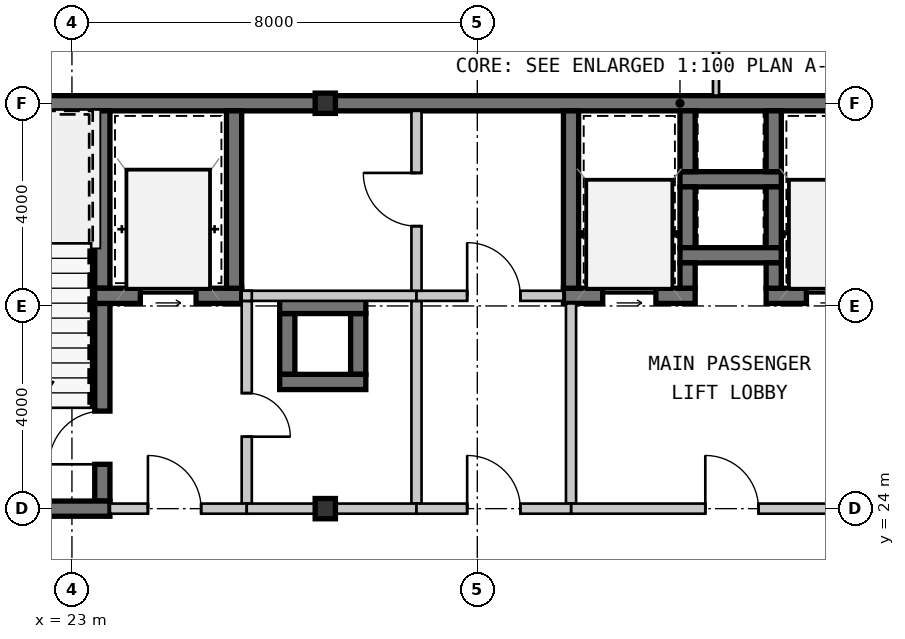
"""IFC4 building model, lengths in metres.
Left out: names, types, materials, properties, quantities, classifications, styles, units other than length and angle.
Written with IfcOpenShell. Run it as: python <this file> out.ifc"""

import sys

from ifc_helpers import new_model, si_unit, direction, frame, frame_2d, origin, origin_2d, place, context, subcontext, project, spatial, rectangle, hollow_rectangle, extrude, source, transform, mapped, element, fill, save


model = new_model("IFC4")
c1 = context("Model", 3, precision=1e-05, world=origin(), true_north=direction((0.0, 1.0)))
c2 = subcontext(c1, "Body", "Model", "MODEL_VIEW")
j1 = project(units=[si_unit("LENGTHUNIT", "METRE"), si_unit("PLANEANGLEUNIT", "RADIAN")], contexts=[c1])
p1 = place(None, origin())
s1 = spatial("IfcSite", under=j1, at=p1, CompositionType="ELEMENT")
p2 = place(p1, origin())
s2 = spatial("IfcBuilding", under=s1, at=p2, CompositionType="ELEMENT")
p3 = place(p2, frame((0.0, 0.0, 120.4)))
s3 = spatial("IfcBuildingStorey", under=s2, at=p3, CompositionType="ELEMENT", Elevation=120.4)
m1 = source(origin(), c2, "Body", "SweptSolid", [
    extrude(hollow_rectangle(XDim=0.4, YDim=0.4, WallThickness=0.016, at=origin_2d()), origin(), (0.0, 0.0, 1.0), 3.15),
])
for number, where, z_axis, x_axis in (
    (1, (28.0, 24.0, 0.0), (0.0, 0.0, 1.0), (1.0, 0.0, 0.0)),
    (2, (28.0, 32.0, 0.0), (0.0, 0.0, 1.0), (1.0, 0.0, 0.0)),
):
    element("IfcColumn", number, at=place(p3, frame(where, z_axis=z_axis, x_axis=x_axis)), inside=s3, PredefinedType="COLUMN", context=c2, shape_type="MappedRepresentation", body=[
        mapped(m1, transform((0.0, 0.0, 0.0), scale=1.0)),
    ])
m2 = source(origin(), c2, "Body", "SweptSolid", [
    extrude(rectangle(XDim=9.15, YDim=0.3, at=frame_2d((4.575, 0.0))), origin(), (0.0, 0.0, 1.0), 2.93),
])
p4 = place(p3, frame((18.85, 32.0, 0.0), z_axis=(0.0, 0.0, 1.0), x_axis=(1.0, 0.0, 0.0)))
e3 = element("IfcWall", 3, at=p4, inside=s3, PredefinedType="SHEAR", context=c2, shape_type="MappedRepresentation", body=[
    mapped(m2, transform((0.0, 0.0, 0.0), scale=1.0)),
])
m3 = source(origin(), c2, "Body", "SweptSolid", [
    extrude(rectangle(XDim=11.2, YDim=0.3, at=frame_2d((5.6, 0.0))), origin(), (0.0, 0.0, 1.0), 2.93),
])
p5 = place(p3, frame((28.0, 32.0, 0.0), z_axis=(0.0, 0.0, 1.0), x_axis=(1.0, 0.0, 0.0)))
e4 = element("IfcWall", 4, at=p5, inside=s3, PredefinedType="SHEAR", context=c2, shape_type="MappedRepresentation", body=[
    mapped(m3, transform((0.0, 0.0, 0.0), scale=1.0)),
])
m4 = source(origin(), c2, "Body", "SweptSolid", [
    extrude(rectangle(XDim=3.5, YDim=0.3, at=frame_2d((1.75, 0.0))), origin(), (0.0, 0.0, 1.0), 2.93),
])
p6 = place(p3, frame((23.6, 28.35, 0.0), z_axis=(0.0, 0.0, 1.0), x_axis=(0.0, 1.0, 0.0)))
e5 = element("IfcWall", 5, at=p6, inside=s3, PredefinedType="SHEAR", context=c2, shape_type="MappedRepresentation", body=[
    mapped(m4, transform((0.0, 0.0, 0.0), scale=1.0)),
])
m5 = source(origin(), c2, "Body", "SweptSolid", [
    extrude(rectangle(XDim=3.9, YDim=0.3, at=frame_2d((1.95, 0.0))), origin(), (0.0, 0.0, 1.0), 2.93),
])
p7 = place(p3, frame((23.6, 24.15, 0.0), z_axis=(0.0, 0.0, 1.0), x_axis=(0.0, 1.0, 0.0)))
e6 = element("IfcWall", 6, at=p7, inside=s3, PredefinedType="SHEAR", context=c2, shape_type="MappedRepresentation", body=[
    mapped(m5, transform((0.0, 0.0, 0.0), scale=1.0)),
])
m6 = source(origin(), c2, "Body", "SweptSolid", [
    extrude(rectangle(XDim=1.05, YDim=2.1, at=frame_2d((0.525, 1.05))), frame((0.0, 0.16, 0.0), z_axis=(0.0, -1.0, 0.0), x_axis=(1.0, 0.0, 0.0)), (0.0, 0.0, 1.0), 0.32),
])
p8 = place(p7, frame((0.725, 0.0, 0.0)))
e7 = element("IfcOpeningElement", 7, at=p8, cuts=e6, PredefinedType="OPENING", context=c2, shape_type="MappedRepresentation", body=[
    mapped(m6, transform((0.0, 0.0, 0.0), scale=1.0)),
])
m7 = source(origin(), c2, "Body", "SweptSolid", [
    extrude(rectangle(XDim=4.9, YDim=0.3, at=frame_2d((2.45, 0.0))), origin(), (0.0, 0.0, 1.0), 2.93),
])
p9 = place(p3, frame((18.85, 24.0, 0.0), z_axis=(0.0, 0.0, 1.0), x_axis=(1.0, 0.0, 0.0)))
e8 = element("IfcWall", 8, at=p9, inside=s3, PredefinedType="SHEAR", context=c2, shape_type="MappedRepresentation", body=[
    mapped(m7, transform((0.0, 0.0, 0.0), scale=1.0)),
])
m8 = source(origin(), c2, "Body", "SweptSolid", [
    extrude(rectangle(XDim=2.9, YDim=0.3, at=frame_2d((1.45, 0.0))), origin(), (0.0, 0.0, 1.0), 2.93),
])
p10 = place(p3, frame((23.45, 28.2, 0.0), z_axis=(0.0, 0.0, 1.0), x_axis=(1.0, 0.0, 0.0)))
e9 = element("IfcWall", 9, at=p10, inside=s3, PredefinedType="SHEAR", context=c2, shape_type="MappedRepresentation", body=[
    mapped(m8, transform((0.0, 0.0, 0.0), scale=1.0)),
])
m9 = source(origin(), c2, "Body", "SweptSolid", [
    extrude(rectangle(XDim=1.1, YDim=2.15, at=frame_2d((0.55, 1.075))), frame((0.0, 0.16, 0.0), z_axis=(0.0, -1.0, 0.0), x_axis=(1.0, 0.0, 0.0)), (0.0, 0.0, 1.0), 0.32),
])
p11 = place(p10, frame((0.9, 0.0, 0.0)))
e10 = element("IfcOpeningElement", 10, at=p11, cuts=e9, PredefinedType="OPENING", context=c2, shape_type="MappedRepresentation", body=[
    mapped(m9, transform((0.0, 0.0, 0.0), scale=1.0)),
])
p12 = place(p3, frame((26.2, 28.35, 0.0), z_axis=(0.0, 0.0, 1.0), x_axis=(0.0, 1.0, 0.0)))
e11 = element("IfcWall", 11, at=p12, inside=s3, PredefinedType="SHEAR", context=c2, shape_type="MappedRepresentation", body=[
    mapped(m4, transform((0.0, 0.0, 0.0), scale=1.0)),
])
m10 = source(origin(), c2, "Body", "SweptSolid", [
    extrude(rectangle(XDim=4.0, YDim=0.2, at=frame_2d((2.0, 0.0))), origin(), (0.0, 0.0, 1.0), 2.93),
])
p13 = place(p3, frame((26.45, 24.1, 0.0), z_axis=(0.0, 0.0, 1.0), x_axis=(0.0, 1.0, 0.0)))
e12 = element("IfcWall", 12, at=p13, inside=s3, PredefinedType="SOLIDWALL", context=c2, shape_type="MappedRepresentation", body=[
    mapped(m10, transform((0.0, 0.0, 0.0), scale=1.0)),
])
m11 = source(origin(), c2, "Body", "SweptSolid", [
    extrude(rectangle(XDim=0.86, YDim=2.1, at=frame_2d((0.43, 1.05))), frame((0.0, 0.11, 0.0), z_axis=(0.0, -1.0, 0.0), x_axis=(1.0, 0.0, 0.0)), (0.0, 0.0, 1.0), 0.22),
])
p14 = place(p13, frame((1.32, 0.0, 0.0)))
e13 = element("IfcOpeningElement", 13, at=p14, cuts=e12, PredefinedType="OPENING", context=c2, shape_type="MappedRepresentation", body=[
    mapped(m11, transform((0.0, 0.0, 0.0), scale=1.0)),
])
m12 = source(origin(), c2, "Body", "SweptSolid", [
    extrude(rectangle(XDim=2.7, YDim=0.2, at=frame_2d((1.35, 0.0))), origin(), (0.0, 0.0, 1.0), 2.47),
])
p15 = place(p3, frame((23.75, 24.0, 0.0), z_axis=(0.0, 0.0, 1.0), x_axis=(1.0, 0.0, 0.0)))
e14 = element("IfcWall", 14, at=p15, inside=s3, PredefinedType="SOLIDWALL", context=c2, shape_type="MappedRepresentation", body=[
    mapped(m12, transform((0.0, 0.0, 0.0), scale=1.0)),
])
m13 = source(origin(), c2, "Body", "SweptSolid", [
    extrude(rectangle(XDim=1.05, YDim=2.1, at=frame_2d((0.525, 1.05))), frame((0.0, 0.11, 0.0), z_axis=(0.0, -1.0, 0.0), x_axis=(1.0, 0.0, 0.0)), (0.0, 0.0, 1.0), 0.22),
])
p16 = place(p15, frame((0.75, 0.0, 0.0)))
e15 = element("IfcOpeningElement", 15, at=p16, cuts=e14, PredefinedType="OPENING", context=c2, shape_type="MappedRepresentation", body=[
    mapped(m13, transform((0.0, 0.0, 0.0), scale=1.0)),
])
m14 = source(origin(), c2, "Body", "SweptSolid", [
    extrude(rectangle(XDim=2.0, YDim=0.3, at=frame_2d((1.0, 0.0))), origin(), (0.0, 0.0, 1.0), 2.93),
])
p17 = place(p3, frame((35.0, 30.5, 0.0), z_axis=(0.0, 0.0, 1.0), x_axis=(1.0, 0.0, 0.0)))
e16 = element("IfcWall", 16, at=p17, inside=s3, PredefinedType="SHEAR", context=c2, shape_type="MappedRepresentation", body=[
    mapped(m14, transform((0.0, 0.0, 0.0), scale=1.0)),
])
m15 = source(origin(), c2, "Body", "SweptSolid", [
    extrude(rectangle(XDim=1.2, YDim=0.3, at=frame_2d((0.6, 0.0))), origin(), (0.0, 0.0, 1.0), 2.93),
])
for number, where, z_axis, x_axis in (
    (17, (35.15, 31.85, 0.0), (0.0, 0.0, 1.0), (0.0, -1.0, 0.0)),
    (18, (36.85, 30.65, 0.0), (0.0, 0.0, 1.0), (0.0, 1.0, 0.0)),
    (19, (35.15, 30.35, 0.0), (0.0, 0.0, 1.0), (0.0, -1.0, 0.0)),
    (20, (36.85, 29.15, 0.0), (0.0, 0.0, 1.0), (0.0, 1.0, 0.0)),
):
    element("IfcWall", number, at=place(p3, frame(where, z_axis=z_axis, x_axis=x_axis)), inside=s3, PredefinedType="SHEAR", context=c2, shape_type="MappedRepresentation", body=[
        mapped(m15, transform((0.0, 0.0, 0.0), scale=1.0)),
    ])
p18 = place(p3, frame((35.0, 29.0, 0.0), z_axis=(0.0, 0.0, 1.0), x_axis=(1.0, 0.0, 0.0)))
e21 = element("IfcWall", 21, at=p18, inside=s3, PredefinedType="SHEAR", context=c2, shape_type="MappedRepresentation", body=[
    mapped(m14, transform((0.0, 0.0, 0.0), scale=1.0)),
])
for number, where, z_axis, x_axis in (
    (22, (28.65, 26.65, 0.0), (0.0, 0.0, 1.0), (0.0, 1.0, 0.0)),
    (23, (27.25, 27.85, 0.0), (0.0, 0.0, 1.0), (0.0, -1.0, 0.0)),
):
    element("IfcWall", number, at=place(p3, frame(where, z_axis=z_axis, x_axis=x_axis)), inside=s3, PredefinedType="SHEAR", context=c2, shape_type="MappedRepresentation", body=[
        mapped(m15, transform((0.0, 0.0, 0.0), scale=1.0)),
    ])
m16 = source(origin(), c2, "Body", "SweptSolid", [
    extrude(rectangle(XDim=1.7, YDim=0.3, at=frame_2d((0.85, 0.0))), origin(), (0.0, 0.0, 1.0), 2.93),
])
for number, where, z_axis, x_axis in (
    (24, (28.8, 28.0, 0.0), (0.0, 0.0, 1.0), (-1.0, 0.0, 0.0)),
    (25, (27.1, 26.5, 0.0), (0.0, 0.0, 1.0), (1.0, 0.0, 0.0)),
):
    element("IfcWall", number, at=place(p3, frame(where, z_axis=z_axis, x_axis=x_axis)), inside=s3, PredefinedType="SHEAR", context=c2, shape_type="MappedRepresentation", body=[
        mapped(m16, transform((0.0, 0.0, 0.0), scale=1.0)),
    ])
m17 = source(origin(), c2, "Body", "SweptSolid", [
    extrude(rectangle(XDim=2.6, YDim=0.3, at=frame_2d((1.3, 0.0))), origin(), (0.0, 0.0, 1.0), 2.93),
])
p19 = place(p3, frame((32.7, 28.2, 0.0), z_axis=(0.0, 0.0, 1.0), x_axis=(1.0, 0.0, 0.0)))
e26 = element("IfcWall", 26, at=p19, inside=s3, PredefinedType="SHEAR", context=c2, shape_type="MappedRepresentation", body=[
    mapped(m17, transform((0.0, 0.0, 0.0), scale=1.0)),
])
m18 = source(origin(), c2, "Body", "SweptSolid", [
    extrude(rectangle(XDim=1.05, YDim=2.15, at=frame_2d((0.525, 1.075))), frame((0.0, 0.16, 0.0), z_axis=(0.0, -1.0, 0.0), x_axis=(1.0, 0.0, 0.0)), (0.0, 0.0, 1.0), 0.32),
])
p20 = place(p19, frame((0.775, 0.0, 0.0)))
e27 = element("IfcOpeningElement", 27, at=p20, cuts=e26, PredefinedType="OPENING", context=c2, shape_type="MappedRepresentation", body=[
    mapped(m18, transform((0.0, 0.0, 0.0), scale=1.0)),
])
m19 = source(origin(), c2, "Body", "SweptSolid", [
    extrude(rectangle(XDim=0.5, YDim=0.3, at=frame_2d((0.25, 0.0))), origin(), (0.0, 0.0, 1.0), 2.93),
])
p21 = place(p3, frame((35.15, 28.35, 0.0), z_axis=(0.0, 0.0, 1.0), x_axis=(0.0, 1.0, 0.0)))
e28 = element("IfcWall", 28, at=p21, inside=s3, PredefinedType="SHEAR", context=c2, shape_type="MappedRepresentation", body=[
    mapped(m19, transform((0.0, 0.0, 0.0), scale=1.0)),
])
p22 = place(p3, frame((32.85, 31.85, 0.0), z_axis=(0.0, 0.0, 1.0), x_axis=(0.0, -1.0, 0.0)))
e29 = element("IfcWall", 29, at=p22, inside=s3, PredefinedType="SHEAR", context=c2, shape_type="MappedRepresentation", body=[
    mapped(m4, transform((0.0, 0.0, 0.0), scale=1.0)),
])
m20 = source(origin(), c2, "Body", "SweptSolid", [
    extrude(rectangle(XDim=2.5, YDim=0.3, at=frame_2d((1.25, 0.0))), origin(), (0.0, 0.0, 1.0), 2.93),
])
p23 = place(p3, frame((36.7, 28.2, 0.0), z_axis=(0.0, 0.0, 1.0), x_axis=(1.0, 0.0, 0.0)))
e30 = element("IfcWall", 30, at=p23, inside=s3, PredefinedType="SHEAR", context=c2, shape_type="MappedRepresentation", body=[
    mapped(m20, transform((0.0, 0.0, 0.0), scale=1.0)),
])
p24 = place(p23, frame((0.795, 0.0, 0.0)))
e31 = element("IfcOpeningElement", 31, at=p24, cuts=e30, PredefinedType="OPENING", context=c2, shape_type="MappedRepresentation", body=[
    mapped(m18, transform((0.0, 0.0, 0.0), scale=1.0)),
])
p25 = place(p3, frame((36.85, 28.85, 0.0), z_axis=(0.0, 0.0, 1.0), x_axis=(0.0, -1.0, 0.0)))
e32 = element("IfcWall", 32, at=p25, inside=s3, PredefinedType="SHEAR", context=c2, shape_type="MappedRepresentation", body=[
    mapped(m19, transform((0.0, 0.0, 0.0), scale=1.0)),
])
m21 = source(origin(), c2, "Body", "SweptSolid", [
    extrude(rectangle(XDim=3.95, YDim=0.2, at=frame_2d((1.975, 0.0))), origin(), (0.0, 0.0, 1.0), 2.93),
])
p26 = place(p3, frame((32.85, 24.1, 0.0), z_axis=(0.0, 0.0, 1.0), x_axis=(0.0, 1.0, 0.0)))
e33 = element("IfcWall", 33, at=p26, inside=s3, PredefinedType="SOLIDWALL", context=c2, shape_type="MappedRepresentation", body=[
    mapped(m21, transform((0.0, 0.0, 0.0), scale=1.0)),
])
m22 = source(origin(), c2, "Body", "SweptSolid", [
    extrude(rectangle(XDim=6.35, YDim=0.2, at=frame_2d((3.175, 0.0))), origin(), (0.0, 0.0, 1.0), 2.47),
])
p27 = place(p3, frame((39.2, 24.0, 0.0), z_axis=(0.0, 0.0, 1.0), x_axis=(-1.0, 0.0, 0.0)))
e34 = element("IfcWall", 34, at=p27, inside=s3, PredefinedType="SOLIDWALL", context=c2, shape_type="MappedRepresentation", body=[
    mapped(m22, transform((0.0, 0.0, 0.0), scale=1.0)),
])
p28 = place(p27, frame((2.65, 0.0, 0.0)))
e35 = element("IfcOpeningElement", 35, at=p28, cuts=e34, PredefinedType="OPENING", context=c2, shape_type="MappedRepresentation", body=[
    mapped(m13, transform((0.0, 0.0, 0.0), scale=1.0)),
])
p29 = place(p3, frame((29.8, 28.1, 0.0), z_axis=(0.0, 0.0, 1.0), x_axis=(0.0, -1.0, 0.0)))
e36 = element("IfcWall", 36, at=p29, inside=s3, PredefinedType="SOLIDWALL", context=c2, shape_type="MappedRepresentation", body=[
    mapped(m10, transform((0.0, 0.0, 0.0), scale=1.0)),
])
m23 = source(origin(), c2, "Body", "SweptSolid", [
    extrude(rectangle(XDim=3.35, YDim=0.2, at=frame_2d((1.675, 0.0))), origin(), (0.0, 0.0, 1.0), 2.93),
])
p30 = place(p3, frame((26.45, 28.2, 0.0), z_axis=(0.0, 0.0, 1.0), x_axis=(1.0, 0.0, 0.0)))
e37 = element("IfcWall", 37, at=p30, inside=s3, PredefinedType="SOLIDWALL", context=c2, shape_type="MappedRepresentation", body=[
    mapped(m23, transform((0.0, 0.0, 0.0), scale=1.0)),
])
m24 = source(origin(), c2, "Body", "SweptSolid", [
    extrude(rectangle(XDim=3.35, YDim=0.2, at=frame_2d((1.675, 0.0))), origin(), (0.0, 0.0, 1.0), 2.47),
])
p31 = place(p3, frame((29.8, 24.0, 0.0), z_axis=(0.0, 0.0, 1.0), x_axis=(-1.0, 0.0, 0.0)))
e38 = element("IfcWall", 38, at=p31, inside=s3, PredefinedType="SOLIDWALL", context=c2, shape_type="MappedRepresentation", body=[
    mapped(m24, transform((0.0, 0.0, 0.0), scale=1.0)),
])
m25 = source(origin(), c2, "Body", "SweptSolid", [
    extrude(rectangle(XDim=2.9, YDim=0.2, at=frame_2d((1.45, 0.0))), origin(), (0.0, 0.0, 1.0), 2.93),
])
p32 = place(p3, frame((29.8, 28.2, 0.0), z_axis=(0.0, 0.0, 1.0), x_axis=(1.0, 0.0, 0.0)))
e39 = element("IfcWall", 39, at=p32, inside=s3, PredefinedType="SOLIDWALL", context=c2, shape_type="MappedRepresentation", body=[
    mapped(m25, transform((0.0, 0.0, 0.0), scale=1.0)),
])
p33 = place(p32, frame((1.0, 0.0, 0.0)))
e40 = element("IfcOpeningElement", 40, at=p33, cuts=e39, PredefinedType="OPENING", context=c2, shape_type="MappedRepresentation", body=[
    mapped(m13, transform((0.0, 0.0, 0.0), scale=1.0)),
])
m26 = source(origin(), c2, "Body", "SweptSolid", [
    extrude(rectangle(XDim=3.05, YDim=0.2, at=frame_2d((1.525, 0.0))), origin(), (0.0, 0.0, 1.0), 2.47),
])
p34 = place(p3, frame((32.85, 24.0, 0.0), z_axis=(0.0, 0.0, 1.0), x_axis=(-1.0, 0.0, 0.0)))
e41 = element("IfcWall", 41, at=p34, inside=s3, PredefinedType="SOLIDWALL", context=c2, shape_type="MappedRepresentation", body=[
    mapped(m26, transform((0.0, 0.0, 0.0), scale=1.0)),
])
p35 = place(p34, frame((1.0, 0.0, 0.0)))
e42 = element("IfcOpeningElement", 42, at=p35, cuts=e41, PredefinedType="OPENING", context=c2, shape_type="MappedRepresentation", body=[
    mapped(m13, transform((0.0, 0.0, 0.0), scale=1.0)),
])
m27 = source(origin(), c2, "Body", "SweptSolid", [
    extrude(rectangle(XDim=3.55, YDim=0.2, at=frame_2d((1.775, 0.0))), origin(), (0.0, 0.0, 1.0), 2.93),
])
p36 = place(p3, frame((29.8, 31.85, 0.0), z_axis=(0.0, 0.0, 1.0), x_axis=(0.0, -1.0, 0.0)))
e43 = element("IfcWall", 43, at=p36, inside=s3, PredefinedType="SOLIDWALL", context=c2, shape_type="MappedRepresentation", body=[
    mapped(m27, transform((0.0, 0.0, 0.0), scale=1.0)),
])
p37 = place(p36, frame((1.225, 0.0, 0.0)))
e44 = element("IfcOpeningElement", 44, at=p37, cuts=e43, PredefinedType="OPENING", context=c2, shape_type="MappedRepresentation", body=[
    mapped(m13, transform((0.0, 0.0, 0.0), scale=1.0)),
])
m28 = source(origin(), c2, "Body", "SweptSolid", [
    extrude(rectangle(XDim=4.727, YDim=0.12, at=frame_2d((2.364, 0.0))), origin(), (0.0, 0.0, 1.0), 2.93),
])
p38 = place(p3, frame((35.711, 36.877, 0.0), z_axis=(0.0, 0.0, 1.0), x_axis=(0.0, -1.0, 0.0)))
e45 = element("IfcWall", 45, at=p38, inside=s3, PredefinedType="PARTITIONING", context=c2, shape_type="MappedRepresentation", body=[
    mapped(m28, transform((0.0, 0.0, 0.0), scale=1.0)),
])
m29 = source(origin(), c2, "Body", "SweptSolid", [
    extrude(rectangle(XDim=0.2, YDim=0.2, at=frame_2d((0.1, 0.0))), origin(), (0.0, 0.0, 1.0), 2.93),
])
p39 = place(p3, frame((26.35, 28.2, 0.0), z_axis=(0.0, 0.0, 1.0), x_axis=(1.0, 0.0, 0.0)))
e46 = element("IfcWall", 46, at=p39, inside=s3, PredefinedType="SOLIDWALL", context=c2, shape_type="MappedRepresentation", body=[
    mapped(m29, transform((0.0, 0.0, 0.0), scale=1.0)),
])
m30 = source(origin(), c2, "Body", "SweptSolid", [
    extrude(rectangle(XDim=1.05, YDim=2.1, at=frame_2d((0.525, 1.05))), frame((0.0, 0.025, 0.0), z_axis=(0.0, -1.0, 0.0), x_axis=(1.0, 0.0, 0.0)), (0.0, 0.0, 1.0), 0.05),
])
p40 = place(p8, origin())
e47 = element("IfcDoor", 47, at=p40, inside=s3, OperationType="SINGLE_SWING_LEFT", PredefinedType="DOOR", context=c2, shape_type="MappedRepresentation", body=[
    mapped(m30, transform((0.0, 0.0, 0.0), scale=1.0)),
])
fill(e7, e47)
m31 = source(origin(), c2, "Body", "SweptSolid", [
    extrude(rectangle(XDim=1.1, YDim=2.15, at=frame_2d((0.55, 1.075))), frame((0.0, 0.025, 0.0), z_axis=(0.0, -1.0, 0.0), x_axis=(1.0, 0.0, 0.0)), (0.0, 0.0, 1.0), 0.05),
])
p41 = place(p11, origin())
e48 = element("IfcDoor", 48, at=p41, inside=s3, OperationType="SLIDING_TO_LEFT", PredefinedType="DOOR", context=c2, shape_type="MappedRepresentation", body=[
    mapped(m31, transform((0.0, 0.0, 0.0), scale=1.0)),
])
fill(e10, e48)
p42 = place(p16, origin())
e49 = element("IfcDoor", 49, at=p42, inside=s3, OperationType="SINGLE_SWING_LEFT", PredefinedType="DOOR", context=c2, shape_type="MappedRepresentation", body=[
    mapped(m30, transform((0.0, 0.0, 0.0), scale=1.0)),
])
fill(e15, e49)
m32 = source(origin(), c2, "Body", "SweptSolid", [
    extrude(rectangle(XDim=1.05, YDim=2.15, at=frame_2d((0.525, 1.075))), frame((0.0, 0.025, 0.0), z_axis=(0.0, -1.0, 0.0), x_axis=(1.0, 0.0, 0.0)), (0.0, 0.0, 1.0), 0.05),
])
p43 = place(p20, origin())
e50 = element("IfcDoor", 50, at=p43, inside=s3, OperationType="SLIDING_TO_LEFT", PredefinedType="DOOR", context=c2, shape_type="MappedRepresentation", body=[
    mapped(m32, transform((0.0, 0.0, 0.0), scale=1.0)),
])
fill(e27, e50)
p44 = place(p24, origin())
e51 = element("IfcDoor", 51, at=p44, inside=s3, OperationType="SLIDING_TO_LEFT", PredefinedType="DOOR", context=c2, shape_type="MappedRepresentation", body=[
    mapped(m32, transform((0.0, 0.0, 0.0), scale=1.0)),
])
fill(e31, e51)
p45 = place(p28, frame((1.05, 0.0, 0.0), z_axis=(0.0, 0.0, 1.0), x_axis=(-1.0, 0.0, 0.0)))
e52 = element("IfcDoor", 52, at=p45, inside=s3, OperationType="SINGLE_SWING_LEFT", PredefinedType="DOOR", context=c2, shape_type="MappedRepresentation", body=[
    mapped(m30, transform((0.0, 0.0, 0.0), scale=1.0)),
])
fill(e35, e52)
p46 = place(p33, origin())
e53 = element("IfcDoor", 53, at=p46, inside=s3, OperationType="SINGLE_SWING_LEFT", PredefinedType="DOOR", context=c2, shape_type="MappedRepresentation", body=[
    mapped(m30, transform((0.0, 0.0, 0.0), scale=1.0)),
])
fill(e40, e53)
p47 = place(p35, frame((1.05, 0.0, 0.0), z_axis=(0.0, 0.0, 1.0), x_axis=(-1.0, 0.0, 0.0)))
e54 = element("IfcDoor", 54, at=p47, inside=s3, OperationType="SINGLE_SWING_LEFT", PredefinedType="DOOR", context=c2, shape_type="MappedRepresentation", body=[
    mapped(m30, transform((0.0, 0.0, 0.0), scale=1.0)),
])
fill(e42, e54)
p48 = place(p37, frame((1.05, 0.0, 0.0), z_axis=(0.0, 0.0, 1.0), x_axis=(-1.0, 0.0, 0.0)))
e55 = element("IfcDoor", 55, at=p48, inside=s3, OperationType="SINGLE_SWING_RIGHT", PredefinedType="DOOR", context=c2, shape_type="MappedRepresentation", body=[
    mapped(m30, transform((0.0, 0.0, 0.0), scale=1.0)),
])
fill(e44, e55)
m33 = source(origin(), c2, "Body", "SweptSolid", [
    extrude(rectangle(XDim=0.86, YDim=2.1, at=frame_2d((0.43, 1.05))), frame((0.0, 0.025, 0.0), z_axis=(0.0, -1.0, 0.0), x_axis=(1.0, 0.0, 0.0)), (0.0, 0.0, 1.0), 0.05),
])
p49 = place(p14, frame((0.86, 0.0, 0.0), z_axis=(0.0, 0.0, 1.0), x_axis=(-1.0, 0.0, 0.0)))
e56 = element("IfcDoor", 56, at=p49, inside=s3, OperationType="SINGLE_SWING_RIGHT", PredefinedType="DOOR", context=c2, shape_type="MappedRepresentation", body=[
    mapped(m33, transform((0.0, 0.0, 0.0), scale=1.0)),
])
fill(e13, e56)
save(model, sys.argv[1])
